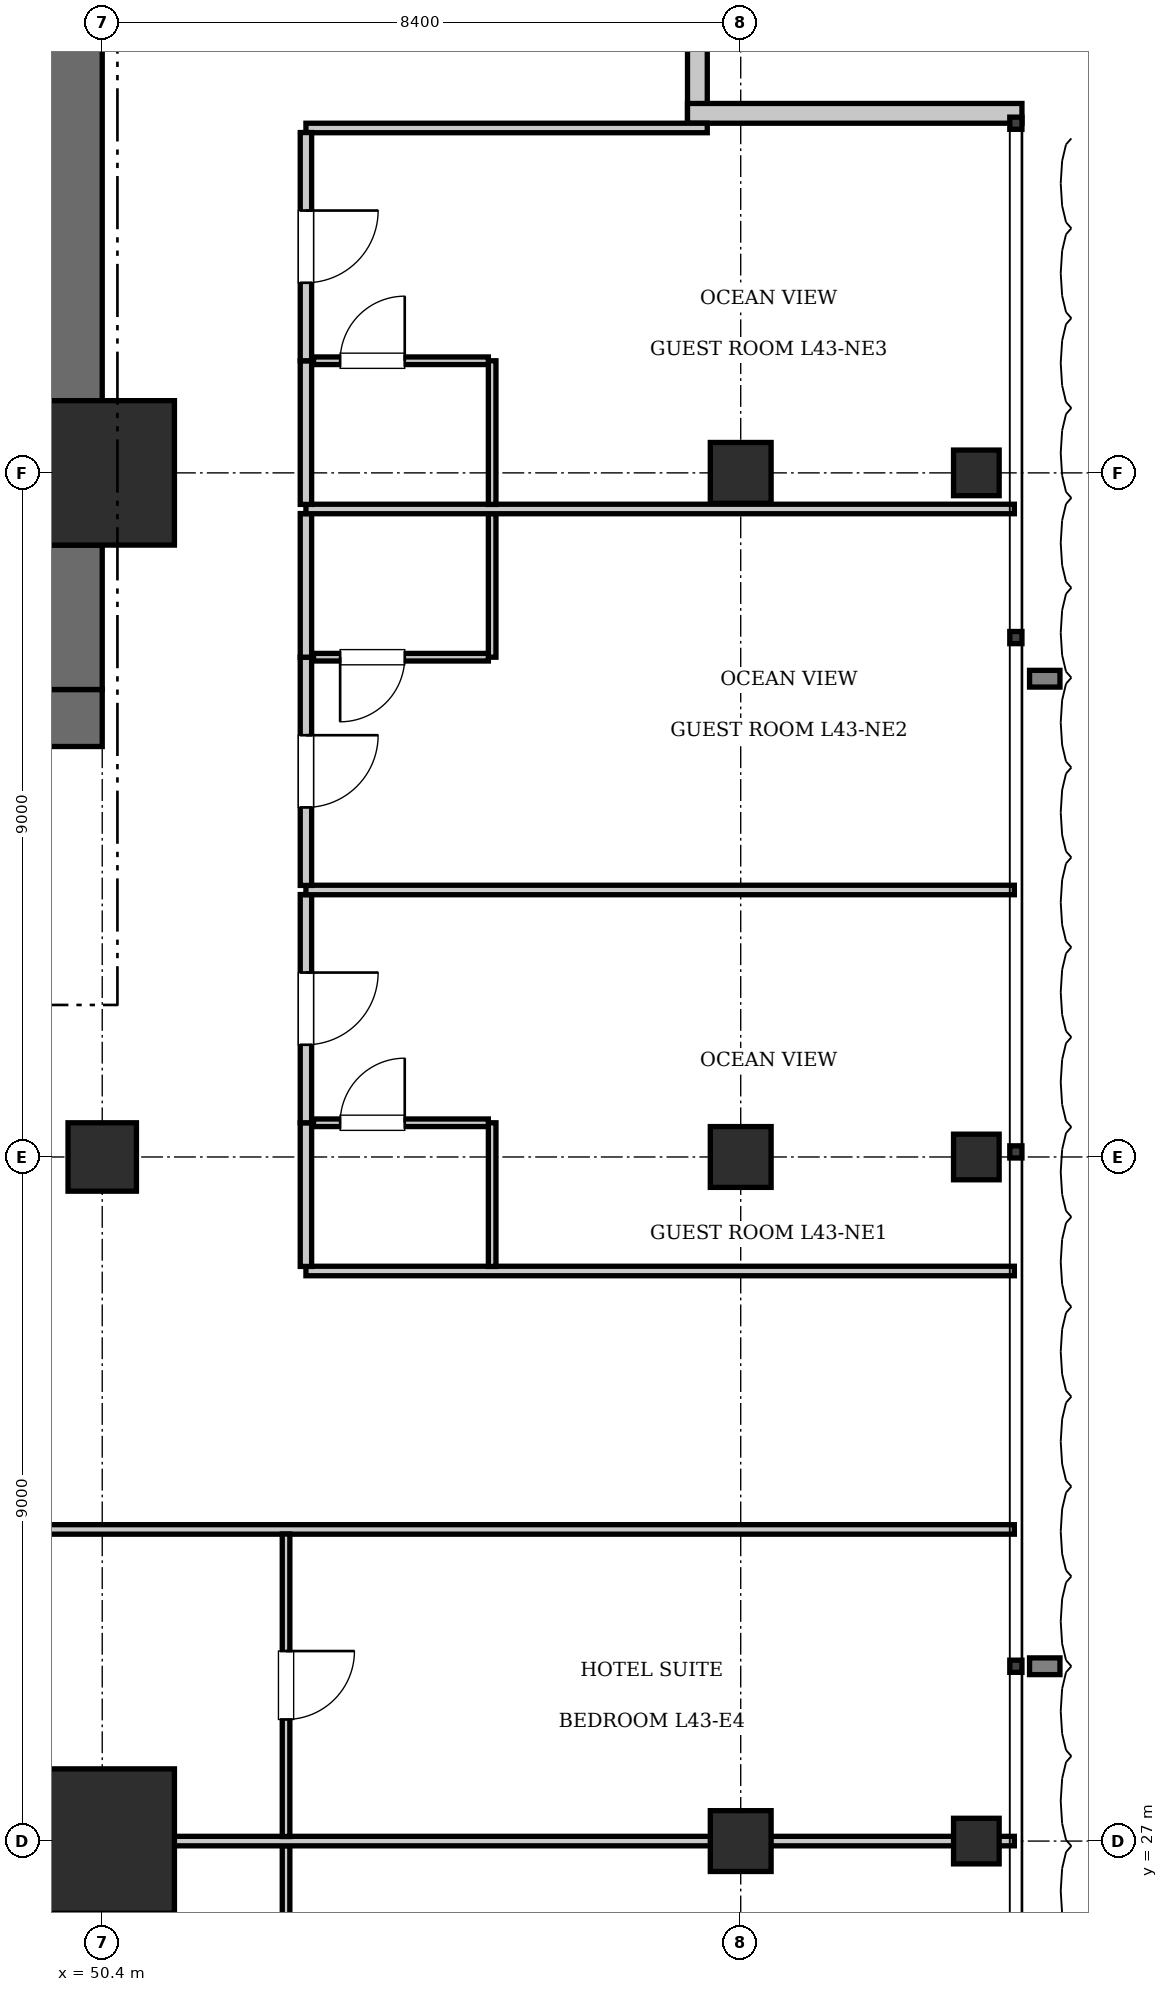
"""IFC4 building model, lengths in metres.
Left out: names, types, materials, properties, quantities, classifications, styles, units other than length and angle.
Written with IfcOpenShell. Run it as: python <this file> out.ifc"""

import sys

from ifc_helpers import new_model, si_unit, direction, frame, frame_2d, origin, origin_2d, place, context, subcontext, project, spatial, rectangle, i_section, extrude, element, fill, save


model = new_model("IFC4")
c1 = context("Model", 3, precision=1e-05, world=origin(), true_north=direction((0.0, 1.0)))
c2 = subcontext(c1, "Body", "Model", "MODEL_VIEW")
j1 = project(units=[si_unit("LENGTHUNIT", "METRE"), si_unit("PLANEANGLEUNIT", "RADIAN")], contexts=[c1])
p1 = place(None, origin())
s1 = spatial("IfcSite", under=j1, at=p1, CompositionType="ELEMENT")
p2 = place(p1, origin())
s2 = spatial("IfcBuilding", under=s1, at=p2, CompositionType="ELEMENT")
p3 = place(p2, frame((0.0, 0.0, 177.45)))
s3 = spatial("IfcBuildingStorey", under=s2, at=p3, CompositionType="ELEMENT", Elevation=177.45)
for number, where, z_axis, x_axis in (
    (1, (50.4, 27.0, 0.0), (0.0, 0.0, 1.0), (1.0, 0.0, 0.0)),
    (2, (50.4, 45.0, 0.0), (0.0, 0.0, 1.0), (1.0, 0.0, 0.0)),
):
    element("IfcColumn", number, at=place(p3, frame(where, z_axis=z_axis, x_axis=x_axis)), inside=s3, PredefinedType="COLUMN", context=c2, shape_type="SweptSolid", body=[
        extrude(rectangle(XDim=1.9, YDim=1.9, at=origin_2d()), origin(), (0.0, 0.0, 1.0), 3.85),
    ])
p4 = place(p3, frame((43.6, 41.775, 0.0), z_axis=(0.0, 0.0, 1.0), x_axis=(1.0, 0.0, 0.0)))
e3 = element("IfcWall", 3, at=p4, inside=s3, PredefinedType="SHEAR", context=c2, shape_type="SweptSolid", body=[
    extrude(rectangle(XDim=6.8, YDim=0.75, at=frame_2d((3.4, 0.0))), origin(), (0.0, 0.0, 1.0), 3.85),
])
p5 = place(p4, frame((3.9, 0.0, 0.0)))
e4 = element("IfcOpeningElement", 4, at=p5, cuts=e3, PredefinedType="OPENING", context=c2, shape_type="SweptSolid", body=[
    extrude(rectangle(XDim=1.15, YDim=2.15, at=frame_2d((0.575, 1.075))), frame((0.0, 0.385, 0.0), z_axis=(0.0, -1.0, 0.0), x_axis=(1.0, 0.0, 0.0)), (0.0, 0.0, 1.0), 0.77),
])
p6 = place(p4, frame((0.55, 0.0, 0.0)))
e5 = element("IfcOpeningElement", 5, at=p6, cuts=e3, PredefinedType="OPENING", context=c2, shape_type="SweptSolid", body=[
    extrude(rectangle(XDim=1.1, YDim=2.2, at=frame_2d((0.55, 1.1))), frame((0.0, 0.385, 0.0), z_axis=(0.0, -1.0, 0.0), x_axis=(1.0, 0.0, 0.0)), (0.0, 0.0, 1.0), 0.77),
])
p7 = place(p3, frame((50.025, 42.15, 0.0), z_axis=(0.0, 0.0, 1.0), x_axis=(0.0, 1.0, 0.0)))
e6 = element("IfcWall", 6, at=p7, inside=s3, PredefinedType="SHEAR", context=c2, shape_type="SweptSolid", body=[
    extrude(rectangle(XDim=1.9, YDim=0.75, at=frame_2d((0.95, 0.0))), origin(), (0.0, 0.0, 1.0), 3.85),
])
p8 = place(p3, frame((50.025, 45.95, 0.0), z_axis=(0.0, 0.0, 1.0), x_axis=(0.0, 1.0, 0.0)))
e7 = element("IfcWall", 7, at=p8, inside=s3, PredefinedType="SHEAR", context=c2, shape_type="SweptSolid", body=[
    extrude(rectangle(XDim=7.3, YDim=0.75, at=frame_2d((3.65, 0.0))), origin(), (0.0, 0.0, 1.0), 3.85),
])
p9 = place(p3, frame((50.4, 36.0, 0.0), z_axis=(0.0, 0.0, 1.0), x_axis=(1.0, 0.0, 0.0)))
e8 = element("IfcColumn", 8, at=p9, inside=s3, PredefinedType="COLUMN", context=c2, shape_type="SweptSolid", body=[
    extrude(rectangle(XDim=0.9, YDim=0.9, at=origin_2d()), origin(), (0.0, 0.0, 1.0), 3.85),
])
for number, where, z_axis, x_axis in (
    (9, (58.8, 27.0, 0.0), (0.0, 0.0, 1.0), (1.0, 0.0, 0.0)),
    (10, (58.8, 36.0, 0.0), (0.0, 0.0, 1.0), (1.0, 0.0, 0.0)),
    (11, (58.8, 45.0, 0.0), (0.0, 0.0, 1.0), (1.0, 0.0, 0.0)),
):
    element("IfcColumn", number, at=place(p3, frame(where, z_axis=z_axis, x_axis=x_axis)), inside=s3, PredefinedType="COLUMN", context=c2, shape_type="SweptSolid", body=[
        extrude(rectangle(XDim=0.8, YDim=0.8, at=origin_2d()), origin(), (0.0, 0.0, 1.0), 3.85),
    ])
for number, where, z_axis, x_axis in (
    (12, (61.9, 27.0, 0.0), (0.0, 0.0, 1.0), (1.0, 0.0, 0.0)),
    (13, (61.9, 36.0, 0.0), (0.0, 0.0, 1.0), (1.0, 0.0, 0.0)),
    (14, (61.9, 45.0, 0.0), (0.0, 0.0, 1.0), (1.0, 0.0, 0.0)),
):
    element("IfcColumn", number, at=place(p3, frame(where, z_axis=z_axis, x_axis=x_axis)), inside=s3, PredefinedType="COLUMN", context=c2, shape_type="SweptSolid", body=[
        extrude(i_section(OverallWidth=0.6, OverallDepth=0.6, WebThickness=0.025, FlangeThickness=0.038, at=origin_2d()), origin(), (0.0, 0.0, 1.0), 3.85),
    ])
for number, where, z_axis, x_axis in (
    (15, (58.23, 54.0, 0.0), (0.0, 0.0, 1.0), (0.0, -1.0, 0.0)),
    (16, (58.1, 49.73, 0.0), (0.0, 0.0, 1.0), (1.0, 0.0, 0.0)),
):
    element("IfcWall", number, at=place(p3, frame(where, z_axis=z_axis, x_axis=x_axis)), inside=s3, PredefinedType="SOLIDWALL", context=c2, shape_type="SweptSolid", body=[
        extrude(rectangle(XDim=4.4, YDim=0.26, at=frame_2d((2.2, 0.0))), origin(), (0.0, 0.0, 1.0), 3.61),
    ])
p10 = place(p3, frame((39.88, 31.1, 0.0), z_axis=(0.0, 0.0, 1.0), x_axis=(1.0, 0.0, 0.0)))
e17 = element("IfcWall", 17, at=p10, inside=s3, PredefinedType="PARTITIONING", context=c2, shape_type="SweptSolid", body=[
    extrude(rectangle(XDim=22.52, YDim=0.125, at=frame_2d((11.26, 0.0))), origin(), (0.0, 0.0, 1.0), 3.61),
])
p11 = place(p3, frame((52.818, 22.96, 0.0), z_axis=(0.0, 0.0, 1.0), x_axis=(0.0, 1.0, 0.0)))
e18 = element("IfcWall", 18, at=p11, inside=s3, PredefinedType="PARTITIONING", context=c2, shape_type="SweptSolid", body=[
    extrude(rectangle(XDim=3.98, YDim=0.1, at=frame_2d((1.99, 0.0))), origin(), (0.0, 0.0, 1.0), 3.61),
])
p12 = place(p11, frame((1.54, 0.0, 0.0)))
e19 = element("IfcOpeningElement", 19, at=p12, cuts=e18, PredefinedType="OPENING", context=c2, shape_type="SweptSolid", body=[
    extrude(rectangle(XDim=0.9, YDim=2.1, at=frame_2d((0.45, 1.05))), frame((0.0, 0.06, 0.0), z_axis=(0.0, -1.0, 0.0), x_axis=(1.0, 0.0, 0.0)), (0.0, 0.0, 1.0), 0.12),
])
p13 = place(p3, frame((39.88, 27.0, 0.0), z_axis=(0.0, 0.0, 1.0), x_axis=(1.0, 0.0, 0.0)))
e20 = element("IfcWall", 20, at=p13, inside=s3, PredefinedType="PARTITIONING", context=c2, shape_type="SweptSolid", body=[
    extrude(rectangle(XDim=22.52, YDim=0.125, at=frame_2d((11.26, 0.0))), origin(), (0.0, 0.0, 1.0), 2.41),
])
p14 = place(p3, frame((52.818, 27.06, 0.0), z_axis=(0.0, 0.0, 1.0), x_axis=(0.0, 1.0, 0.0)))
e21 = element("IfcWall", 21, at=p14, inside=s3, PredefinedType="PARTITIONING", context=c2, shape_type="SweptSolid", body=[
    extrude(rectangle(XDim=3.98, YDim=0.1, at=frame_2d((1.99, 0.0))), origin(), (0.0, 0.0, 1.0), 3.61),
])
p15 = place(p14, frame((1.54, 0.0, 0.0)))
e22 = element("IfcOpeningElement", 22, at=p15, cuts=e21, PredefinedType="OPENING", context=c2, shape_type="SweptSolid", body=[
    extrude(rectangle(XDim=0.9, YDim=2.1, at=frame_2d((0.45, 1.05))), frame((0.0, 0.06, 0.0), z_axis=(0.0, -1.0, 0.0), x_axis=(1.0, 0.0, 0.0)), (0.0, 0.0, 1.0), 0.12),
])
p16 = place(p3, frame((53.08, 34.5, 0.0), z_axis=(0.0, 0.0, 1.0), x_axis=(1.0, 0.0, 0.0)))
e23 = element("IfcWall", 23, at=p16, inside=s3, PredefinedType="PARTITIONING", context=c2, shape_type="SweptSolid", body=[
    extrude(rectangle(XDim=9.32, YDim=0.125, at=frame_2d((4.66, 0.0))), origin(), (0.0, 0.0, 1.0), 3.61),
])
p17 = place(p3, frame((53.08, 49.538, 0.0), z_axis=(0.0, 0.0, 1.0), x_axis=(1.0, 0.0, 0.0)))
e24 = element("IfcWall", 24, at=p17, inside=s3, PredefinedType="PARTITIONING", context=c2, shape_type="SweptSolid", body=[
    extrude(rectangle(XDim=5.28, YDim=0.125, at=frame_2d((2.64, 0.0))), origin(), (0.0, 0.0, 1.0), 3.61),
])
p18 = place(p3, frame((53.08, 34.56, 0.0), z_axis=(0.0, 0.0, 1.0), x_axis=(0.0, 1.0, 0.0)))
e25 = element("IfcWall", 25, at=p18, inside=s3, PredefinedType="PARTITIONING", context=c2, shape_type="SweptSolid", body=[
    extrude(rectangle(XDim=1.89, YDim=0.15, at=frame_2d((0.945, 0.0))), origin(), (0.0, 0.0, 1.0), 3.61),
])
p19 = place(p3, frame((53.08, 36.45, 0.0), z_axis=(0.0, 0.0, 1.0), x_axis=(0.0, 1.0, 0.0)))
e26 = element("IfcWall", 26, at=p19, inside=s3, PredefinedType="PARTITIONING", context=c2, shape_type="SweptSolid", body=[
    extrude(rectangle(XDim=3.002, YDim=0.15, at=frame_2d((1.501, 0.0))), origin(), (0.0, 0.0, 1.0), 3.61),
])
p20 = place(p19, frame((1.026, 0.0, 0.0)))
e27 = element("IfcOpeningElement", 27, at=p20, cuts=e26, PredefinedType="OPENING", context=c2, shape_type="SweptSolid", body=[
    extrude(rectangle(XDim=0.95, YDim=2.15, at=frame_2d((0.475, 1.075))), frame((0.0, 0.085, 0.0), z_axis=(0.0, -1.0, 0.0), x_axis=(1.0, 0.0, 0.0)), (0.0, 0.0, 1.0), 0.17),
])
p21 = place(p3, frame((55.53, 34.56, 0.0), z_axis=(0.0, 0.0, 1.0), x_axis=(0.0, 1.0, 0.0)))
e28 = element("IfcWall", 28, at=p21, inside=s3, PredefinedType="PARTITIONING", context=c2, shape_type="SweptSolid", body=[
    extrude(rectangle(XDim=1.89, YDim=0.1, at=frame_2d((0.945, 0.0))), origin(), (0.0, 0.0, 1.0), 3.61),
])
p22 = place(p3, frame((53.18, 36.45, 0.0), z_axis=(0.0, 0.0, 1.0), x_axis=(1.0, 0.0, 0.0)))
e29 = element("IfcWall", 29, at=p22, inside=s3, PredefinedType="PARTITIONING", context=c2, shape_type="SweptSolid", body=[
    extrude(rectangle(XDim=2.3, YDim=0.1, at=frame_2d((1.15, 0.0))), origin(), (0.0, 0.0, 1.0), 3.61),
])
p23 = place(p22, frame((0.35, 0.0, 0.0)))
e30 = element("IfcOpeningElement", 30, at=p23, cuts=e29, PredefinedType="OPENING", context=c2, shape_type="SweptSolid", body=[
    extrude(rectangle(XDim=0.85, YDim=2.1, at=frame_2d((0.425, 1.05))), frame((0.0, 0.06, 0.0), z_axis=(0.0, -1.0, 0.0), x_axis=(1.0, 0.0, 0.0)), (0.0, 0.0, 1.0), 0.12),
])
p24 = place(p3, frame((53.08, 39.512, 0.0), z_axis=(0.0, 0.0, 1.0), x_axis=(1.0, 0.0, 0.0)))
e31 = element("IfcWall", 31, at=p24, inside=s3, PredefinedType="PARTITIONING", context=c2, shape_type="SweptSolid", body=[
    extrude(rectangle(XDim=9.32, YDim=0.125, at=frame_2d((4.66, 0.0))), origin(), (0.0, 0.0, 1.0), 3.61),
])
p25 = place(p3, frame((53.08, 39.573, 0.0), z_axis=(0.0, 0.0, 1.0), x_axis=(0.0, 1.0, 0.0)))
e32 = element("IfcWall", 32, at=p25, inside=s3, PredefinedType="PARTITIONING", context=c2, shape_type="SweptSolid", body=[
    extrude(rectangle(XDim=3.002, YDim=0.15, at=frame_2d((1.501, 0.0))), origin(), (0.0, 0.0, 1.0), 3.61),
])
p26 = place(p25, frame((1.026, 0.0, 0.0)))
e33 = element("IfcOpeningElement", 33, at=p26, cuts=e32, PredefinedType="OPENING", context=c2, shape_type="SweptSolid", body=[
    extrude(rectangle(XDim=0.95, YDim=2.15, at=frame_2d((0.475, 1.075))), frame((0.0, 0.085, 0.0), z_axis=(0.0, -1.0, 0.0), x_axis=(1.0, 0.0, 0.0)), (0.0, 0.0, 1.0), 0.17),
])
p27 = place(p3, frame((53.08, 42.575, 0.0), z_axis=(0.0, 0.0, 1.0), x_axis=(0.0, 1.0, 0.0)))
e34 = element("IfcWall", 34, at=p27, inside=s3, PredefinedType="PARTITIONING", context=c2, shape_type="SweptSolid", body=[
    extrude(rectangle(XDim=1.89, YDim=0.15, at=frame_2d((0.945, 0.0))), origin(), (0.0, 0.0, 1.0), 3.61),
])
p28 = place(p3, frame((55.53, 42.575, 0.0), z_axis=(0.0, 0.0, 1.0), x_axis=(0.0, 1.0, 0.0)))
e35 = element("IfcWall", 35, at=p28, inside=s3, PredefinedType="PARTITIONING", context=c2, shape_type="SweptSolid", body=[
    extrude(rectangle(XDim=1.89, YDim=0.1, at=frame_2d((0.945, 0.0))), origin(), (0.0, 0.0, 1.0), 3.61),
])
p29 = place(p3, frame((53.18, 42.575, 0.0), z_axis=(0.0, 0.0, 1.0), x_axis=(1.0, 0.0, 0.0)))
e36 = element("IfcWall", 36, at=p29, inside=s3, PredefinedType="PARTITIONING", context=c2, shape_type="SweptSolid", body=[
    extrude(rectangle(XDim=2.3, YDim=0.1, at=frame_2d((1.15, 0.0))), origin(), (0.0, 0.0, 1.0), 3.61),
])
p30 = place(p29, frame((0.35, 0.0, 0.0)))
e37 = element("IfcOpeningElement", 37, at=p30, cuts=e36, PredefinedType="OPENING", context=c2, shape_type="SweptSolid", body=[
    extrude(rectangle(XDim=0.85, YDim=2.1, at=frame_2d((0.425, 1.05))), frame((0.0, 0.06, 0.0), z_axis=(0.0, -1.0, 0.0), x_axis=(1.0, 0.0, 0.0)), (0.0, 0.0, 1.0), 0.12),
])
p31 = place(p3, frame((53.08, 44.525, 0.0), z_axis=(0.0, 0.0, 1.0), x_axis=(1.0, 0.0, 0.0)))
e38 = element("IfcWall", 38, at=p31, inside=s3, PredefinedType="PARTITIONING", context=c2, shape_type="SweptSolid", body=[
    extrude(rectangle(XDim=9.32, YDim=0.125, at=frame_2d((4.66, 0.0))), origin(), (0.0, 0.0, 1.0), 3.61),
])
p32 = place(p3, frame((53.08, 44.585, 0.0), z_axis=(0.0, 0.0, 1.0), x_axis=(0.0, 1.0, 0.0)))
e39 = element("IfcWall", 39, at=p32, inside=s3, PredefinedType="PARTITIONING", context=c2, shape_type="SweptSolid", body=[
    extrude(rectangle(XDim=1.89, YDim=0.15, at=frame_2d((0.945, 0.0))), origin(), (0.0, 0.0, 1.0), 3.61),
])
p33 = place(p3, frame((53.08, 46.475, 0.0), z_axis=(0.0, 0.0, 1.0), x_axis=(0.0, 1.0, 0.0)))
e40 = element("IfcWall", 40, at=p33, inside=s3, PredefinedType="PARTITIONING", context=c2, shape_type="SweptSolid", body=[
    extrude(rectangle(XDim=3.002, YDim=0.15, at=frame_2d((1.501, 0.0))), origin(), (0.0, 0.0, 1.0), 3.61),
])
p34 = place(p33, frame((1.026, 0.0, 0.0)))
e41 = element("IfcOpeningElement", 41, at=p34, cuts=e40, PredefinedType="OPENING", context=c2, shape_type="SweptSolid", body=[
    extrude(rectangle(XDim=0.95, YDim=2.15, at=frame_2d((0.475, 1.075))), frame((0.0, 0.085, 0.0), z_axis=(0.0, -1.0, 0.0), x_axis=(1.0, 0.0, 0.0)), (0.0, 0.0, 1.0), 0.17),
])
p35 = place(p3, frame((55.53, 44.585, 0.0), z_axis=(0.0, 0.0, 1.0), x_axis=(0.0, 1.0, 0.0)))
e42 = element("IfcWall", 42, at=p35, inside=s3, PredefinedType="PARTITIONING", context=c2, shape_type="SweptSolid", body=[
    extrude(rectangle(XDim=1.89, YDim=0.1, at=frame_2d((0.945, 0.0))), origin(), (0.0, 0.0, 1.0), 3.61),
])
p36 = place(p3, frame((53.18, 46.475, 0.0), z_axis=(0.0, 0.0, 1.0), x_axis=(1.0, 0.0, 0.0)))
e43 = element("IfcWall", 43, at=p36, inside=s3, PredefinedType="PARTITIONING", context=c2, shape_type="SweptSolid", body=[
    extrude(rectangle(XDim=2.3, YDim=0.1, at=frame_2d((1.15, 0.0))), origin(), (0.0, 0.0, 1.0), 3.61),
])
p37 = place(p36, frame((0.35, 0.0, 0.0)))
e44 = element("IfcOpeningElement", 44, at=p37, cuts=e43, PredefinedType="OPENING", context=c2, shape_type="SweptSolid", body=[
    extrude(rectangle(XDim=0.85, YDim=2.1, at=frame_2d((0.425, 1.05))), frame((0.0, 0.06, 0.0), z_axis=(0.0, -1.0, 0.0), x_axis=(1.0, 0.0, 0.0)), (0.0, 0.0, 1.0), 0.12),
])
p38 = place(p15, frame((0.9, 0.0, 0.0), z_axis=(0.0, 0.0, 1.0), x_axis=(-1.0, 0.0, 0.0)))
e45 = element("IfcDoor", 45, at=p38, inside=s3, OperationType="SINGLE_SWING_LEFT", PredefinedType="DOOR", context=c2, shape_type="SweptSolid", body=[
    extrude(rectangle(XDim=0.9, YDim=2.1, at=frame_2d((0.45, 1.05))), frame((0.0, 0.025, 0.0), z_axis=(0.0, -1.0, 0.0), x_axis=(1.0, 0.0, 0.0)), (0.0, 0.0, 1.0), 0.05),
])
fill(e22, e45)
p39 = place(p23, origin())
e46 = element("IfcDoor", 46, at=p39, inside=s3, OperationType="SINGLE_SWING_RIGHT", PredefinedType="DOOR", context=c2, shape_type="SweptSolid", body=[
    extrude(rectangle(XDim=0.85, YDim=2.1, at=frame_2d((0.425, 1.05))), frame((0.0, 0.025, 0.0), z_axis=(0.0, -1.0, 0.0), x_axis=(1.0, 0.0, 0.0)), (0.0, 0.0, 1.0), 0.05),
])
fill(e30, e46)
p40 = place(p20, frame((0.95, 0.0, 0.0), z_axis=(0.0, 0.0, 1.0), x_axis=(-1.0, 0.0, 0.0)))
e47 = element("IfcDoor", 47, at=p40, inside=s3, OperationType="SINGLE_SWING_LEFT", PredefinedType="DOOR", context=c2, shape_type="SweptSolid", body=[
    extrude(rectangle(XDim=0.95, YDim=2.15, at=frame_2d((0.475, 1.075))), frame((0.0, 0.025, 0.0), z_axis=(0.0, -1.0, 0.0), x_axis=(1.0, 0.0, 0.0)), (0.0, 0.0, 1.0), 0.05),
])
fill(e27, e47)
p41 = place(p30, frame((0.85, 0.0, 0.0), z_axis=(0.0, 0.0, 1.0), x_axis=(-1.0, 0.0, 0.0)))
e48 = element("IfcDoor", 48, at=p41, inside=s3, OperationType="SINGLE_SWING_RIGHT", PredefinedType="DOOR", context=c2, shape_type="SweptSolid", body=[
    extrude(rectangle(XDim=0.85, YDim=2.1, at=frame_2d((0.425, 1.05))), frame((0.0, 0.025, 0.0), z_axis=(0.0, -1.0, 0.0), x_axis=(1.0, 0.0, 0.0)), (0.0, 0.0, 1.0), 0.05),
])
fill(e37, e48)
p42 = place(p26, frame((0.95, 0.0, 0.0), z_axis=(0.0, 0.0, 1.0), x_axis=(-1.0, 0.0, 0.0)))
e49 = element("IfcDoor", 49, at=p42, inside=s3, OperationType="SINGLE_SWING_LEFT", PredefinedType="DOOR", context=c2, shape_type="SweptSolid", body=[
    extrude(rectangle(XDim=0.95, YDim=2.15, at=frame_2d((0.475, 1.075))), frame((0.0, 0.025, 0.0), z_axis=(0.0, -1.0, 0.0), x_axis=(1.0, 0.0, 0.0)), (0.0, 0.0, 1.0), 0.05),
])
fill(e33, e49)
p43 = place(p37, origin())
e50 = element("IfcDoor", 50, at=p43, inside=s3, OperationType="SINGLE_SWING_RIGHT", PredefinedType="DOOR", context=c2, shape_type="SweptSolid", body=[
    extrude(rectangle(XDim=0.85, YDim=2.1, at=frame_2d((0.425, 1.05))), frame((0.0, 0.025, 0.0), z_axis=(0.0, -1.0, 0.0), x_axis=(1.0, 0.0, 0.0)), (0.0, 0.0, 1.0), 0.05),
])
fill(e44, e50)
p44 = place(p34, frame((0.95, 0.0, 0.0), z_axis=(0.0, 0.0, 1.0), x_axis=(-1.0, 0.0, 0.0)))
e51 = element("IfcDoor", 51, at=p44, inside=s3, OperationType="SINGLE_SWING_LEFT", PredefinedType="DOOR", context=c2, shape_type="SweptSolid", body=[
    extrude(rectangle(XDim=0.95, YDim=2.15, at=frame_2d((0.475, 1.075))), frame((0.0, 0.025, 0.0), z_axis=(0.0, -1.0, 0.0), x_axis=(1.0, 0.0, 0.0)), (0.0, 0.0, 1.0), 0.05),
])
fill(e41, e51)
save(model, sys.argv[1])
